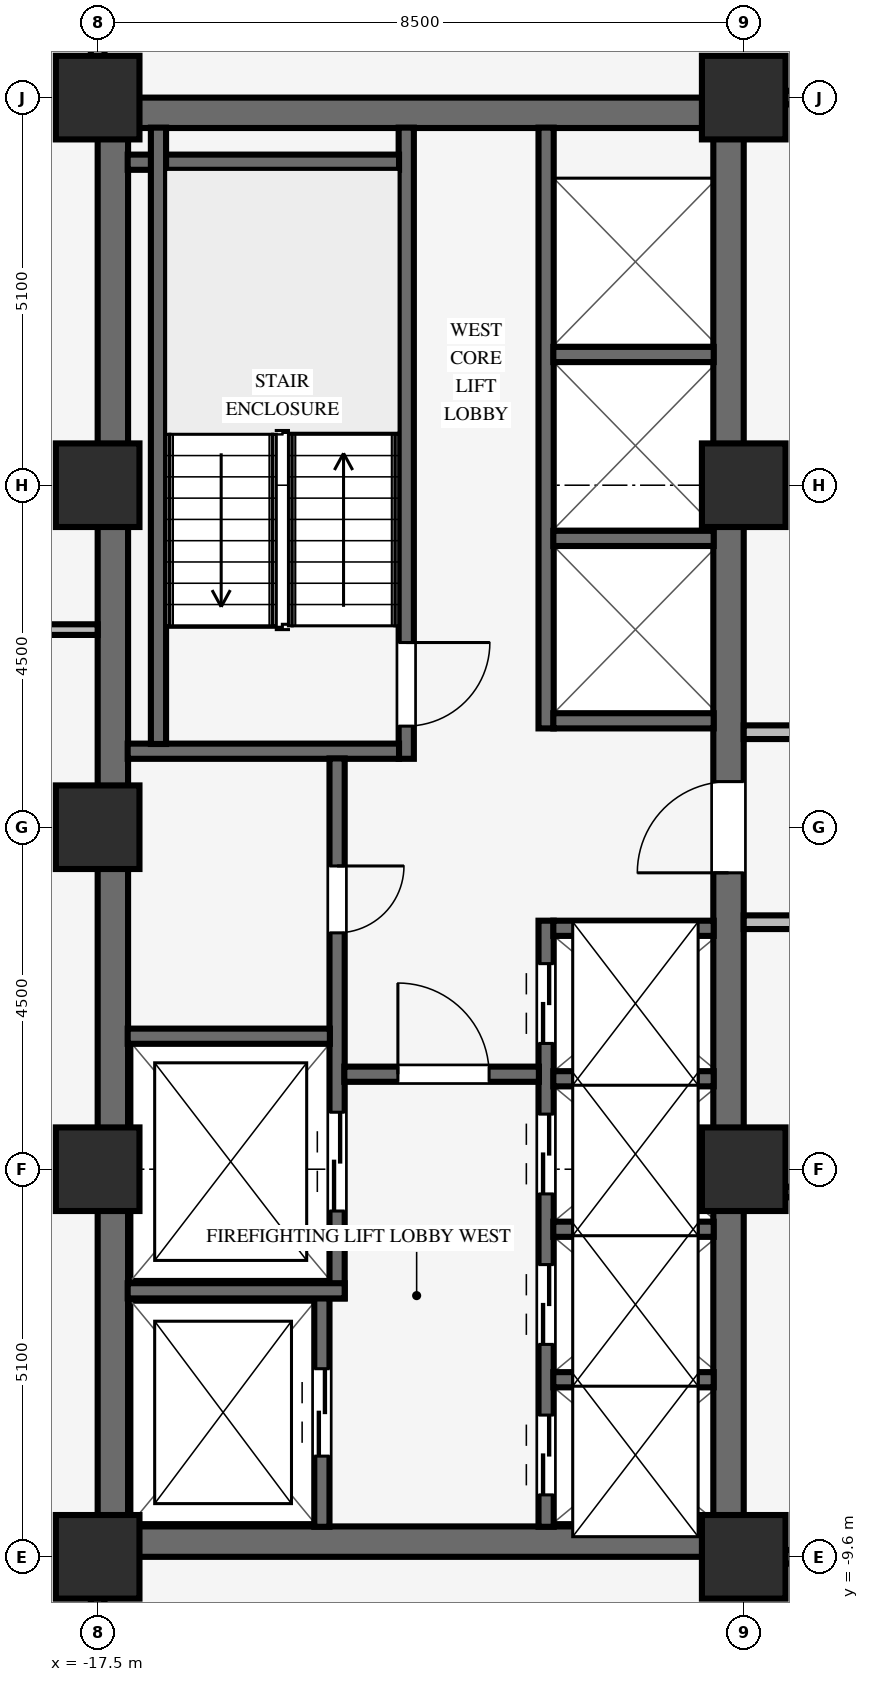
"""IFC4 building model, lengths in metres.
Left out: names, types, materials, properties, quantities, classifications, styles, units other than length and angle.
Written with IfcOpenShell. Run it as: python <this file> out.ifc"""

import sys

from ifc_helpers import new_model, si_unit, direction, frame, frame_2d, origin, origin_2d, place, context, subcontext, project, spatial, rectangle, extrude, source, transform, mapped, element, fill, save


model = new_model("IFC4")
c1 = context("Model", 3, precision=1e-05, world=origin(), true_north=direction((0.0, 1.0)))
c2 = subcontext(c1, "Body", "Model", "MODEL_VIEW")
j1 = project(units=[si_unit("LENGTHUNIT", "METRE"), si_unit("PLANEANGLEUNIT", "RADIAN")], contexts=[c1])
p1 = place(None, origin())
s1 = spatial("IfcSite", under=j1, at=p1, CompositionType="ELEMENT")
p2 = place(p1, origin())
s2 = spatial("IfcBuilding", under=s1, at=p2, CompositionType="ELEMENT")
p3 = place(p2, frame((0.0, 0.0, 109.25)))
s3 = spatial("IfcBuildingStorey", under=s2, at=p3, CompositionType="ELEMENT", Elevation=109.25)
for number, where, z_axis, x_axis in (
    (1, (-17.5, -9.4, 0.0), (0.0, 0.0, 1.0), (1.0, 0.0, 0.0)),
    (2, (-17.5, 9.4, 0.0), (0.0, 0.0, 1.0), (1.0, 0.0, 0.0)),
):
    element("IfcWall", number, at=place(p3, frame(where, z_axis=z_axis, x_axis=x_axis)), inside=s3, PredefinedType="SHEAR", context=c2, shape_type="SweptSolid", body=[
        extrude(rectangle(XDim=8.5, YDim=0.4, at=frame_2d((4.25, 0.0))), origin(), (0.0, 0.0, 1.0), 3.37),
    ])
p4 = place(p3, frame((-17.3, -9.205, 0.0), z_axis=(0.0, 0.0, 1.0), x_axis=(0.0, 1.0, 0.0)))
e3 = element("IfcWall", 3, at=p4, inside=s3, PredefinedType="SHEAR", context=c2, shape_type="SweptSolid", body=[
    extrude(rectangle(XDim=18.41, YDim=0.4, at=frame_2d((9.205, 0.0))), origin(), (0.0, 0.0, 1.0), 3.37),
])
p5 = place(p3, frame((-9.2, -9.205, 0.0), z_axis=(0.0, 0.0, 1.0), x_axis=(0.0, 1.0, 0.0)))
e4 = element("IfcWall", 4, at=p5, inside=s3, PredefinedType="SHEAR", context=c2, shape_type="SweptSolid", body=[
    extrude(rectangle(XDim=18.41, YDim=0.4, at=frame_2d((9.205, 0.0))), origin(), (0.0, 0.0, 1.0), 3.37),
])
p6 = place(p5, frame((8.605, 0.0, 0.0)))
e5 = element("IfcOpeningElement", 5, at=p6, cuts=e4, PredefinedType="OPENING", context=c2, shape_type="SweptSolid", body=[
    extrude(rectangle(XDim=1.2, YDim=2.15, at=frame_2d((0.6, 1.075))), frame((0.0, 0.21, 0.0), z_axis=(0.0, -1.0, 0.0), x_axis=(1.0, 0.0, 0.0)), (0.0, 0.0, 1.0), 0.42),
])
for number, where, z_axis, x_axis in (
    (6, (-17.5, -9.6, 0.0), (0.0, 0.0, 1.0), (1.0, 0.0, 0.0)),
    (7, (-17.5, -4.5, 0.0), (0.0, 0.0, 1.0), (1.0, 0.0, 0.0)),
    (8, (-17.5, 4.5, 0.0), (0.0, 0.0, 1.0), (1.0, 0.0, 0.0)),
    (9, (-17.5, 9.6, 0.0), (0.0, 0.0, 1.0), (1.0, 0.0, 0.0)),
    (10, (-9.0, -9.6, 0.0), (0.0, 0.0, 1.0), (1.0, 0.0, 0.0)),
    (11, (-9.0, -4.5, 0.0), (0.0, 0.0, 1.0), (1.0, 0.0, 0.0)),
    (12, (-9.0, 4.5, 0.0), (0.0, 0.0, 1.0), (1.0, 0.0, 0.0)),
    (13, (-9.0, 9.6, 0.0), (0.0, 0.0, 1.0), (1.0, 0.0, 0.0)),
    (14, (-17.5, 0.0, 0.0), (0.0, 0.0, 1.0), (1.0, 0.0, 0.0)),
):
    element("IfcColumn", number, at=place(p3, frame(where, z_axis=z_axis, x_axis=x_axis)), inside=s3, PredefinedType="COLUMN", context=c2, shape_type="SweptSolid", body=[
        extrude(rectangle(XDim=1.1, YDim=1.1, at=origin_2d()), origin(), (0.0, 0.0, 1.0), 3.37),
    ])
p7 = place(p3, frame((-13.44, 0.9, 0.0), z_axis=(0.0, 0.0, 1.0), x_axis=(0.0, 1.0, 0.0)))
e15 = element("IfcWall", 15, at=p7, inside=s3, PredefinedType="SHEAR", context=c2, shape_type="SweptSolid", body=[
    extrude(rectangle(XDim=8.305, YDim=0.2, at=frame_2d((4.153, 0.0))), origin(), (0.0, 0.0, 1.0), 3.37),
])
p8 = place(p7, frame((1.53, 0.0, 0.0), z_axis=(0.0, 0.0, 1.0), x_axis=(-1.0, 0.0, 0.0)))
e16 = element("IfcOpeningElement", 16, at=p8, cuts=e15, PredefinedType="OPENING", context=c2, shape_type="SweptSolid", body=[
    extrude(rectangle(XDim=1.1, YDim=2.15, at=frame_2d((0.55, 1.075))), frame((0.0, 0.11, 0.0), z_axis=(0.0, -1.0, 0.0), x_axis=(1.0, 0.0, 0.0)), (0.0, 0.0, 1.0), 0.22),
])
for number, where, z_axis, x_axis in (
    (17, (-17.105, 1.0, 0.0), (0.0, 0.0, 1.0), (1.0, 0.0, 0.0)),
    (18, (-17.105, 8.75, 0.0), (0.0, 0.0, 1.0), (1.0, 0.0, 0.0)),
):
    element("IfcWall", number, at=place(p3, frame(where, z_axis=z_axis, x_axis=x_axis)), inside=s3, PredefinedType="SHEAR", context=c2, shape_type="SweptSolid", body=[
        extrude(rectangle(XDim=3.57, YDim=0.2, at=frame_2d((1.785, 0.0))), origin(), (0.0, 0.0, 1.0), 3.37),
    ])
p9 = place(p3, frame((-16.7, 1.095, 0.0), z_axis=(0.0, 0.0, 1.0), x_axis=(0.0, 1.0, 0.0)))
e19 = element("IfcWall", 19, at=p9, inside=s3, PredefinedType="SHEAR", context=c2, shape_type="SweptSolid", body=[
    extrude(rectangle(XDim=8.11, YDim=0.2, at=frame_2d((4.055, 0.0))), origin(), (0.0, 0.0, 1.0), 3.37),
])
p10 = place(p3, frame((-14.55, -9.205, 0.0), z_axis=(0.0, 0.0, 1.0), x_axis=(0.0, 1.0, 0.0)))
e20 = element("IfcWall", 20, at=p10, inside=s3, PredefinedType="SHEAR", context=c2, shape_type="SweptSolid", body=[
    extrude(rectangle(XDim=3.01, YDim=0.2, at=frame_2d((1.505, 0.0))), origin(), (0.0, 0.0, 1.0), 3.37),
])
p11 = place(p10, frame((0.93, 0.0, 0.0)))
e21 = element("IfcOpeningElement", 21, at=p11, cuts=e20, PredefinedType="OPENING", context=c2, shape_type="SweptSolid", body=[
    extrude(rectangle(XDim=1.15, YDim=2.15, at=frame_2d((0.575, 1.075))), frame((0.0, 0.11, 0.0), z_axis=(0.0, -1.0, 0.0), x_axis=(1.0, 0.0, 0.0)), (0.0, 0.0, 1.0), 0.22),
])
p12 = place(p3, frame((-14.35, -6.2, 0.0), z_axis=(0.0, 0.0, 1.0), x_axis=(0.0, 1.0, 0.0)))
e22 = element("IfcWall", 22, at=p12, inside=s3, PredefinedType="SHEAR", context=c2, shape_type="SweptSolid", body=[
    extrude(rectangle(XDim=7.105, YDim=0.2, at=frame_2d((3.552, 0.0))), origin(), (0.0, 0.0, 1.0), 3.37),
])
p13 = place(p12, frame((5.69, 0.0, 0.0), z_axis=(0.0, 0.0, 1.0), x_axis=(-1.0, 0.0, 0.0)))
e23 = element("IfcOpeningElement", 23, at=p13, cuts=e22, PredefinedType="OPENING", context=c2, shape_type="SweptSolid", body=[
    extrude(rectangle(XDim=0.88, YDim=2.1, at=frame_2d((0.44, 1.05))), frame((0.0, 0.11, 0.0), z_axis=(0.0, -1.0, 0.0), x_axis=(1.0, 0.0, 0.0)), (0.0, 0.0, 1.0), 0.22),
])
p14 = place(p12, frame((1.15, 0.0, 0.0)))
e24 = element("IfcOpeningElement", 24, at=p14, cuts=e22, PredefinedType="OPENING", context=c2, shape_type="SweptSolid", body=[
    extrude(rectangle(XDim=1.3, YDim=2.2, at=frame_2d((0.65, 1.1))), frame((0.0, 0.11, 0.0), z_axis=(0.0, -1.0, 0.0), x_axis=(1.0, 0.0, 0.0)), (0.0, 0.0, 1.0), 0.22),
])
p15 = place(p3, frame((-17.105, -6.1, 0.0), z_axis=(0.0, 0.0, 1.0), x_axis=(1.0, 0.0, 0.0)))
e25 = element("IfcWall", 25, at=p15, inside=s3, PredefinedType="SHEAR", context=c2, shape_type="SweptSolid", body=[
    extrude(rectangle(XDim=2.855, YDim=0.2, at=frame_2d((1.427, 0.0))), origin(), (0.0, 0.0, 1.0), 3.37),
])
p16 = place(p3, frame((-17.105, -2.75, 0.0), z_axis=(0.0, 0.0, 1.0), x_axis=(1.0, 0.0, 0.0)))
e26 = element("IfcWall", 26, at=p16, inside=s3, PredefinedType="SHEAR", context=c2, shape_type="SweptSolid", body=[
    extrude(rectangle(XDim=2.66, YDim=0.2, at=frame_2d((1.33, 0.0))), origin(), (0.0, 0.0, 1.0), 3.37),
])
p17 = place(p3, frame((-11.6, -9.205, 0.0), z_axis=(0.0, 0.0, 1.0), x_axis=(0.0, 1.0, 0.0)))
e27 = element("IfcWall", 27, at=p17, inside=s3, PredefinedType="SHEAR", context=c2, shape_type="SweptSolid", body=[
    extrude(rectangle(XDim=7.975, YDim=0.2, at=frame_2d((3.988, 0.0))), origin(), (0.0, 0.0, 1.0), 3.37),
])
p18 = place(p17, frame((0.42, 0.0, 0.0)))
e28 = element("IfcOpeningElement", 28, at=p18, cuts=e27, PredefinedType="OPENING", context=c2, shape_type="SweptSolid", body=[
    extrude(rectangle(XDim=1.05, YDim=2.15, at=frame_2d((0.525, 1.075))), frame((0.0, 0.11, 0.0), z_axis=(0.0, -1.0, 0.0), x_axis=(1.0, 0.0, 0.0)), (0.0, 0.0, 1.0), 0.22),
])
p19 = place(p17, frame((2.4, 0.0, 0.0)))
e29 = element("IfcOpeningElement", 29, at=p19, cuts=e27, PredefinedType="OPENING", context=c2, shape_type="SweptSolid", body=[
    extrude(rectangle(XDim=1.05, YDim=2.15, at=frame_2d((0.525, 1.075))), frame((0.0, 0.11, 0.0), z_axis=(0.0, -1.0, 0.0), x_axis=(1.0, 0.0, 0.0)), (0.0, 0.0, 1.0), 0.22),
])
p20 = place(p17, frame((4.38, 0.0, 0.0)))
e30 = element("IfcOpeningElement", 30, at=p20, cuts=e27, PredefinedType="OPENING", context=c2, shape_type="SweptSolid", body=[
    extrude(rectangle(XDim=1.05, YDim=2.15, at=frame_2d((0.525, 1.075))), frame((0.0, 0.11, 0.0), z_axis=(0.0, -1.0, 0.0), x_axis=(1.0, 0.0, 0.0)), (0.0, 0.0, 1.0), 0.22),
])
p21 = place(p17, frame((6.36, 0.0, 0.0)))
e31 = element("IfcOpeningElement", 31, at=p21, cuts=e27, PredefinedType="OPENING", context=c2, shape_type="SweptSolid", body=[
    extrude(rectangle(XDim=1.05, YDim=2.15, at=frame_2d((0.525, 1.075))), frame((0.0, 0.11, 0.0), z_axis=(0.0, -1.0, 0.0), x_axis=(1.0, 0.0, 0.0)), (0.0, 0.0, 1.0), 0.22),
])
p22 = place(p3, frame((-14.255, -3.25, 0.0), z_axis=(0.0, 0.0, 1.0), x_axis=(1.0, 0.0, 0.0)))
e32 = element("IfcWall", 32, at=p22, inside=s3, PredefinedType="SHEAR", context=c2, shape_type="SweptSolid", body=[
    extrude(rectangle(XDim=2.56, YDim=0.2, at=frame_2d((1.28, 0.0))), origin(), (0.0, 0.0, 1.0), 3.37),
])
p23 = place(p22, frame((0.705, 0.0, 0.0)))
e33 = element("IfcOpeningElement", 33, at=p23, cuts=e32, PredefinedType="OPENING", context=c2, shape_type="SweptSolid", body=[
    extrude(rectangle(XDim=1.2, YDim=2.15, at=frame_2d((0.6, 1.075))), frame((0.0, 0.11, 0.0), z_axis=(0.0, -1.0, 0.0), x_axis=(1.0, 0.0, 0.0)), (0.0, 0.0, 1.0), 0.22),
])
for number, where, z_axis, x_axis in (
    (34, (-11.505, -7.27, 0.0), (0.0, 0.0, 1.0), (1.0, 0.0, 0.0)),
    (35, (-11.505, -5.29, 0.0), (0.0, 0.0, 1.0), (1.0, 0.0, 0.0)),
    (36, (-11.505, -3.31, 0.0), (0.0, 0.0, 1.0), (1.0, 0.0, 0.0)),
    (37, (-11.505, -1.33, 0.0), (0.0, 0.0, 1.0), (1.0, 0.0, 0.0)),
):
    element("IfcWall", number, at=place(p3, frame(where, z_axis=z_axis, x_axis=x_axis)), inside=s3, PredefinedType="SHEAR", context=c2, shape_type="SweptSolid", body=[
        extrude(rectangle(XDim=2.11, YDim=0.2, at=frame_2d((1.055, 0.0))), origin(), (0.0, 0.0, 1.0), 3.37),
    ])
p24 = place(p3, frame((-11.6, 1.3, 0.0), z_axis=(0.0, 0.0, 1.0), x_axis=(0.0, 1.0, 0.0)))
e38 = element("IfcWall", 38, at=p24, inside=s3, PredefinedType="SHEAR", context=c2, shape_type="SweptSolid", body=[
    extrude(rectangle(XDim=7.905, YDim=0.2, at=frame_2d((3.953, 0.0))), origin(), (0.0, 0.0, 1.0), 3.37),
])
for number, where, z_axis, x_axis in (
    (39, (-11.505, 1.4, 0.0), (0.0, 0.0, 1.0), (1.0, 0.0, 0.0)),
    (40, (-11.505, 3.8, 0.0), (0.0, 0.0, 1.0), (1.0, 0.0, 0.0)),
    (41, (-11.505, 6.22, 0.0), (0.0, 0.0, 1.0), (1.0, 0.0, 0.0)),
):
    element("IfcWall", number, at=place(p3, frame(where, z_axis=z_axis, x_axis=x_axis)), inside=s3, PredefinedType="SHEAR", context=c2, shape_type="SweptSolid", body=[
        extrude(rectangle(XDim=2.11, YDim=0.2, at=frame_2d((1.055, 0.0))), origin(), (0.0, 0.0, 1.0), 3.37),
    ])
p25 = place(p3, frame((-8.454, -9.6, 0.0), z_axis=(0.0, 0.0, 1.0), x_axis=(1.0, 0.0, 0.0)))
e42 = element("IfcWall", 42, at=p25, inside=s3, PredefinedType="PARTITIONING", context=c2, shape_type="SweptSolid", body=[
    extrude(rectangle(XDim=5.254, YDim=0.18, at=frame_2d((2.627, 0.0))), origin(), (0.0, 0.0, 1.0), 2.405),
])
p26 = place(p25, frame((2.147, 0.0, 0.0)))
e43 = element("IfcOpeningElement", 43, at=p26, cuts=e42, PredefinedType="OPENING", context=c2, shape_type="SweptSolid", body=[
    extrude(rectangle(XDim=0.96, YDim=2.1, at=frame_2d((0.48, 1.05))), frame((0.0, 0.1, 0.0), z_axis=(0.0, -1.0, 0.0), x_axis=(1.0, 0.0, 0.0)), (0.0, 0.0, 1.0), 0.2),
])
p27 = place(p3, frame((-8.454, -4.8, 0.0), z_axis=(0.0, 0.0, 1.0), x_axis=(1.0, 0.0, 0.0)))
e44 = element("IfcWall", 44, at=p27, inside=s3, PredefinedType="PARTITIONING", context=c2, shape_type="SweptSolid", body=[
    extrude(rectangle(XDim=5.168, YDim=0.14, at=frame_2d((2.584, 0.0))), origin(), (0.0, 0.0, 1.0), 2.738),
])
p28 = place(p3, frame((-9.0, -1.25, 0.0), z_axis=(0.0, 0.0, 1.0), x_axis=(1.0, 0.0, 0.0)))
e45 = element("IfcWall", 45, at=p28, inside=s3, PredefinedType="PARTITIONING", context=c2, shape_type="SweptSolid", body=[
    extrude(rectangle(XDim=5.8, YDim=0.18, at=frame_2d((2.9, 0.0))), origin(), (0.0, 0.0, 1.0), 3.36),
])
p29 = place(p28, frame((2.42, 0.0, 0.0)))
e46 = element("IfcOpeningElement", 46, at=p29, cuts=e45, PredefinedType="OPENING", context=c2, shape_type="SweptSolid", body=[
    extrude(rectangle(XDim=0.96, YDim=2.1, at=frame_2d((0.48, 1.05))), frame((0.0, 0.1, 0.0), z_axis=(0.0, -1.0, 0.0), x_axis=(1.0, 0.0, 0.0)), (0.0, 0.0, 1.0), 0.2),
])
p30 = place(p3, frame((-9.0, 1.25, 0.0), z_axis=(0.0, 0.0, 1.0), x_axis=(1.0, 0.0, 0.0)))
e47 = element("IfcWall", 47, at=p30, inside=s3, PredefinedType="PARTITIONING", context=c2, shape_type="SweptSolid", body=[
    extrude(rectangle(XDim=5.8, YDim=0.18, at=frame_2d((2.9, 0.0))), origin(), (0.0, 0.0, 1.0), 3.36),
])
p31 = place(p3, frame((-23.68, 2.6, 0.0), z_axis=(0.0, 0.0, 1.0), x_axis=(1.0, 0.0, 0.0)))
e48 = element("IfcWall", 48, at=p31, inside=s3, PredefinedType="PARTITIONING", context=c2, shape_type="SweptSolid", body=[
    extrude(rectangle(XDim=6.18, YDim=0.14, at=frame_2d((3.09, 0.0))), origin(), (0.0, 0.0, 1.0), 3.36),
])
p32 = place(p3, frame((-8.454, 9.6, 0.0), z_axis=(0.0, 0.0, 1.0), x_axis=(1.0, 0.0, 0.0)))
e49 = element("IfcWall", 49, at=p32, inside=s3, PredefinedType="PARTITIONING", context=c2, shape_type="SweptSolid", body=[
    extrude(rectangle(XDim=5.254, YDim=0.18, at=frame_2d((2.627, 0.0))), origin(), (0.0, 0.0, 1.0), 2.405),
])
for number, where, z_axis, x_axis in (
    (50, (-17.5, -11.114, 0.0), (0.0, 0.0, 1.0), (0.0, 1.0, 0.0)),
    (51, (-17.5, 10.146, 0.0), (0.0, 0.0, 1.0), (0.0, 1.0, 0.0)),
):
    element("IfcWall", number, at=place(p3, frame(where, z_axis=z_axis, x_axis=x_axis)), inside=s3, PredefinedType="PARTITIONING", context=c2, shape_type="SweptSolid", body=[
        extrude(rectangle(XDim=0.968, YDim=0.18, at=frame_2d((0.484, 0.0))), origin(), (0.0, 0.0, 1.0), 2.738),
    ])
m1 = source(origin(), c2, "Body", "SweptSolid", [
    extrude(rectangle(XDim=1.1, YDim=2.15, at=frame_2d((0.55, 1.075))), frame((0.0, 0.025, 0.0), z_axis=(0.0, -1.0, 0.0), x_axis=(1.0, 0.0, 0.0)), (0.0, 0.0, 1.0), 0.05),
])
p33 = place(p8, origin())
e52 = element("IfcDoor", 52, at=p33, inside=s3, OperationType="SINGLE_SWING_LEFT", PredefinedType="DOOR", context=c2, shape_type="MappedRepresentation", body=[
    mapped(m1, transform((0.0, 0.0, 0.0), scale=1.0)),
])
fill(e16, e52)
m2 = source(origin(), c2, "Body", "SweptSolid", [
    extrude(rectangle(XDim=0.88, YDim=2.1, at=frame_2d((0.44, 1.05))), frame((0.0, 0.025, 0.0), z_axis=(0.0, -1.0, 0.0), x_axis=(1.0, 0.0, 0.0)), (0.0, 0.0, 1.0), 0.05),
])
p34 = place(p13, origin())
e53 = element("IfcDoor", 53, at=p34, inside=s3, OperationType="SINGLE_SWING_LEFT", PredefinedType="DOOR", context=c2, shape_type="MappedRepresentation", body=[
    mapped(m2, transform((0.0, 0.0, 0.0), scale=1.0)),
])
fill(e23, e53)
m3 = source(origin(), c2, "Body", "SweptSolid", [
    extrude(rectangle(XDim=1.2, YDim=2.15, at=frame_2d((0.6, 1.075))), frame((0.0, 0.025, 0.0), z_axis=(0.0, -1.0, 0.0), x_axis=(1.0, 0.0, 0.0)), (0.0, 0.0, 1.0), 0.05),
])
p35 = place(p23, origin())
e54 = element("IfcDoor", 54, at=p35, inside=s3, OperationType="SINGLE_SWING_LEFT", PredefinedType="DOOR", context=c2, shape_type="MappedRepresentation", body=[
    mapped(m3, transform((0.0, 0.0, 0.0), scale=1.0)),
])
fill(e33, e54)
p36 = place(p6, origin())
e55 = element("IfcDoor", 55, at=p36, inside=s3, OperationType="SINGLE_SWING_LEFT", PredefinedType="DOOR", context=c2, shape_type="MappedRepresentation", body=[
    mapped(m3, transform((0.0, 0.0, 0.0), scale=1.0)),
])
fill(e5, e55)
m4 = source(origin(), c2, "Body", "SweptSolid", [
    extrude(rectangle(XDim=1.15, YDim=2.15, at=frame_2d((0.575, 1.075))), frame((0.0, 0.025, 0.0), z_axis=(0.0, -1.0, 0.0), x_axis=(1.0, 0.0, 0.0)), (0.0, 0.0, 1.0), 0.05),
])
p37 = place(p11, origin())
e56 = element("IfcDoor", 56, at=p37, inside=s3, OperationType="DOUBLE_DOOR_SLIDING", PredefinedType="DOOR", context=c2, shape_type="MappedRepresentation", body=[
    mapped(m4, transform((0.0, 0.0, 0.0), scale=1.0)),
])
fill(e21, e56)
m5 = source(origin(), c2, "Body", "SweptSolid", [
    extrude(rectangle(XDim=1.3, YDim=2.2, at=frame_2d((0.65, 1.1))), frame((0.0, 0.025, 0.0), z_axis=(0.0, -1.0, 0.0), x_axis=(1.0, 0.0, 0.0)), (0.0, 0.0, 1.0), 0.05),
])
p38 = place(p14, origin())
e57 = element("IfcDoor", 57, at=p38, inside=s3, OperationType="DOUBLE_DOOR_SLIDING", PredefinedType="DOOR", context=c2, shape_type="MappedRepresentation", body=[
    mapped(m5, transform((0.0, 0.0, 0.0), scale=1.0)),
])
fill(e24, e57)
m6 = source(origin(), c2, "Body", "SweptSolid", [
    extrude(rectangle(XDim=1.05, YDim=2.15, at=frame_2d((0.525, 1.075))), frame((0.0, 0.025, 0.0), z_axis=(0.0, -1.0, 0.0), x_axis=(1.0, 0.0, 0.0)), (0.0, 0.0, 1.0), 0.05),
])
p39 = place(p18, origin())
e58 = element("IfcDoor", 58, at=p39, inside=s3, OperationType="DOUBLE_DOOR_SLIDING", PredefinedType="DOOR", context=c2, shape_type="MappedRepresentation", body=[
    mapped(m6, transform((0.0, 0.0, 0.0), scale=1.0)),
])
fill(e28, e58)
p40 = place(p19, origin())
e59 = element("IfcDoor", 59, at=p40, inside=s3, OperationType="DOUBLE_DOOR_SLIDING", PredefinedType="DOOR", context=c2, shape_type="MappedRepresentation", body=[
    mapped(m6, transform((0.0, 0.0, 0.0), scale=1.0)),
])
fill(e29, e59)
p41 = place(p20, origin())
e60 = element("IfcDoor", 60, at=p41, inside=s3, OperationType="DOUBLE_DOOR_SLIDING", PredefinedType="DOOR", context=c2, shape_type="MappedRepresentation", body=[
    mapped(m6, transform((0.0, 0.0, 0.0), scale=1.0)),
])
fill(e30, e60)
p42 = place(p21, origin())
e61 = element("IfcDoor", 61, at=p42, inside=s3, OperationType="DOUBLE_DOOR_SLIDING", PredefinedType="DOOR", context=c2, shape_type="MappedRepresentation", body=[
    mapped(m6, transform((0.0, 0.0, 0.0), scale=1.0)),
])
fill(e31, e61)
save(model, sys.argv[1])
